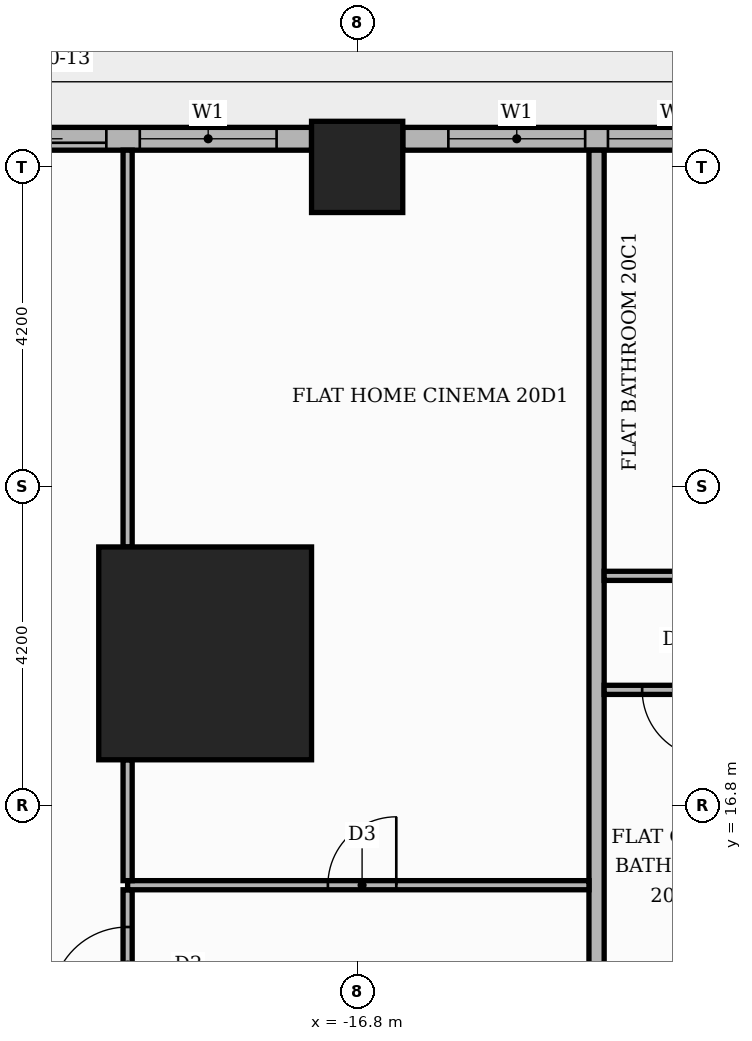
"""IFC4 building model, lengths in metres.
Left out: names, types, materials, properties, quantities, classifications, styles, units other than length and angle.
Written with IfcOpenShell. Run it as: python <this file> out.ifc"""

import sys

from ifc_helpers import new_model, si_unit, direction, frame, frame_2d, origin, origin_2d, place, context, subcontext, project, spatial, rectangle, extrude, element, fill, save


model = new_model("IFC4")
c1 = context("Model", 3, precision=1e-05, world=origin(), true_north=direction((0.0, 1.0)))
c2 = subcontext(c1, "Body", "Model", "MODEL_VIEW")
j1 = project(units=[si_unit("LENGTHUNIT", "METRE"), si_unit("PLANEANGLEUNIT", "RADIAN")], contexts=[c1])
p1 = place(None, origin())
s1 = spatial("IfcSite", under=j1, at=p1, CompositionType="ELEMENT")
p2 = place(p1, origin())
s2 = spatial("IfcBuilding", under=s1, at=p2, CompositionType="ELEMENT")
p3 = place(p2, frame((0.0, 0.0, 87.0)))
s3 = spatial("IfcBuildingStorey", under=s2, at=p3, CompositionType="ELEMENT", Elevation=87.0)
p4 = place(p3, frame((-18.8, 18.8, 0.0), z_axis=(0.0, 0.0, 1.0), x_axis=(1.0, 0.0, 0.0)))
e1 = element("IfcColumn", 1, at=p4, inside=s3, PredefinedType="COLUMN", context=c2, shape_type="SweptSolid", body=[
    extrude(rectangle(XDim=2.8, YDim=2.8, at=origin_2d()), origin(), (0.0, 0.0, 1.0), 3.9),
])
p5 = place(p3, frame((-16.8, 25.2, 0.0), z_axis=(0.0, 0.0, 1.0), x_axis=(1.0, 0.0, 0.0)))
e2 = element("IfcColumn", 2, at=p5, inside=s3, PredefinedType="COLUMN", context=c2, shape_type="SweptSolid", body=[
    extrude(rectangle(XDim=1.2, YDim=1.2, at=origin_2d()), origin(), (0.0, 0.0, 1.0), 3.9),
])
p6 = place(p3, frame((-9.0, 25.57, 0.0), z_axis=(0.0, 0.0, 1.0), x_axis=(-1.0, 0.0, 0.0)))
e3 = element("IfcWall", 3, at=p6, inside=s3, PredefinedType="STANDARD", context=c2, shape_type="SweptSolid", body=[
    extrude(rectangle(XDim=7.2, YDim=0.3, at=frame_2d((3.6, 0.0))), origin(), (0.0, 0.0, 1.0), 3.48),
])
p7 = place(p6, frame((0.6, 0.0, 0.9)))
e4 = element("IfcOpeningElement", 4, at=p7, cuts=e3, PredefinedType="OPENING", context=c2, shape_type="SweptSolid", body=[
    extrude(rectangle(XDim=1.8, YDim=2.1, at=frame_2d((0.9, 1.05))), frame((0.0, 0.16, 0.0), z_axis=(0.0, -1.0, 0.0), x_axis=(1.0, 0.0, 0.0)), (0.0, 0.0, 1.0), 0.32),
])
p8 = place(p6, frame((2.7, 0.0, 0.9)))
e5 = element("IfcOpeningElement", 5, at=p8, cuts=e3, PredefinedType="OPENING", context=c2, shape_type="SweptSolid", body=[
    extrude(rectangle(XDim=1.8, YDim=2.1, at=frame_2d((0.9, 1.05))), frame((0.0, 0.16, 0.0), z_axis=(0.0, -1.0, 0.0), x_axis=(1.0, 0.0, 0.0)), (0.0, 0.0, 1.0), 0.32),
])
p9 = place(p6, frame((4.8, 0.0, 0.9)))
e6 = element("IfcOpeningElement", 6, at=p9, cuts=e3, PredefinedType="OPENING", context=c2, shape_type="SweptSolid", body=[
    extrude(rectangle(XDim=1.8, YDim=2.1, at=frame_2d((0.9, 1.05))), frame((0.0, 0.16, 0.0), z_axis=(0.0, -1.0, 0.0), x_axis=(1.0, 0.0, 0.0)), (0.0, 0.0, 1.0), 0.32),
])
p10 = place(p3, frame((-17.4, 25.57, 0.0), z_axis=(0.0, 0.0, 1.0), x_axis=(-1.0, 0.0, 0.0)))
e7 = element("IfcWall", 7, at=p10, inside=s3, PredefinedType="STANDARD", context=c2, shape_type="SweptSolid", body=[
    extrude(rectangle(XDim=4.82, YDim=0.3, at=frame_2d((2.41, 0.0))), origin(), (0.0, 0.0, 1.0), 3.48),
])
p11 = place(p10, frame((2.7, 0.0, 0.0)))
e8 = element("IfcOpeningElement", 8, at=p11, cuts=e7, PredefinedType="OPENING", context=c2, shape_type="SweptSolid", body=[
    extrude(rectangle(XDim=1.8, YDim=2.4, at=frame_2d((0.9, 1.2))), frame((0.0, 0.16, 0.0), z_axis=(0.0, -1.0, 0.0), x_axis=(1.0, 0.0, 0.0)), (0.0, 0.0, 1.0), 0.32),
])
p12 = place(p10, frame((0.46, 0.0, 0.9)))
e9 = element("IfcOpeningElement", 9, at=p12, cuts=e7, PredefinedType="OPENING", context=c2, shape_type="SweptSolid", body=[
    extrude(rectangle(XDim=1.8, YDim=2.1, at=frame_2d((0.9, 1.05))), frame((0.0, 0.16, 0.0), z_axis=(0.0, -1.0, 0.0), x_axis=(1.0, 0.0, 0.0)), (0.0, 0.0, 1.0), 0.32),
])
p13 = place(p3, frame((-19.82, 13.71, 0.0), z_axis=(0.0, 0.0, 1.0), x_axis=(0.0, 1.0, 0.0)))
e10 = element("IfcWall", 10, at=p13, inside=s3, PredefinedType="PARTITIONING", context=c2, shape_type="SweptSolid", body=[
    extrude(rectangle(XDim=1.98, YDim=0.12, at=frame_2d((0.99, 0.0))), origin(), (0.0, 0.0, 1.0), 3.48),
])
p14 = place(p13, frame((0.49, 0.0, 0.0)))
e11 = element("IfcOpeningElement", 11, at=p14, cuts=e10, PredefinedType="OPENING", context=c2, shape_type="SweptSolid", body=[
    extrude(rectangle(XDim=1.0, YDim=2.1, at=frame_2d((0.5, 1.05))), frame((0.0, 0.07, 0.0), z_axis=(0.0, -1.0, 0.0), x_axis=(1.0, 0.0, 0.0)), (0.0, 0.0, 1.0), 0.14),
])
p15 = place(p3, frame((-13.65, 13.75, 0.0), z_axis=(0.0, 0.0, 1.0), x_axis=(0.0, 1.0, 0.0)))
e12 = element("IfcWall", 12, at=p15, inside=s3, PredefinedType="PARTITIONING", context=c2, shape_type="SweptSolid", body=[
    extrude(rectangle(XDim=11.67, YDim=0.2, at=frame_2d((5.835, 0.0))), origin(), (0.0, 0.0, 1.0), 3.48),
])
p16 = place(p3, frame((-19.82, 15.75, 0.0), z_axis=(0.0, 0.0, 1.0), x_axis=(1.0, 0.0, 0.0)))
e13 = element("IfcWall", 13, at=p16, inside=s3, PredefinedType="PARTITIONING", context=c2, shape_type="SweptSolid", body=[
    extrude(rectangle(XDim=6.07, YDim=0.12, at=frame_2d((3.035, 0.0))), origin(), (0.0, 0.0, 1.0), 3.48),
])
p17 = place(p16, frame((2.635, 0.0, 0.0)))
e14 = element("IfcOpeningElement", 14, at=p17, cuts=e13, PredefinedType="OPENING", context=c2, shape_type="SweptSolid", body=[
    extrude(rectangle(XDim=0.9, YDim=2.1, at=frame_2d((0.45, 1.05))), frame((0.0, 0.07, 0.0), z_axis=(0.0, -1.0, 0.0), x_axis=(1.0, 0.0, 0.0)), (0.0, 0.0, 1.0), 0.14),
])
p18 = place(p3, frame((-19.82, 15.81, 0.0), z_axis=(0.0, 0.0, 1.0), x_axis=(0.0, 1.0, 0.0)))
e15 = element("IfcWall", 15, at=p18, inside=s3, PredefinedType="PARTITIONING", context=c2, shape_type="SweptSolid", body=[
    extrude(rectangle(XDim=1.59, YDim=0.12, at=frame_2d((0.795, 0.0))), origin(), (0.0, 0.0, 1.0), 3.48),
])
p19 = place(p3, frame((-13.55, 18.32, 0.0), z_axis=(0.0, 0.0, 1.0), x_axis=(1.0, 0.0, 0.0)))
e16 = element("IfcWall", 16, at=p19, inside=s3, PredefinedType="PARTITIONING", context=c2, shape_type="SweptSolid", body=[
    extrude(rectangle(XDim=20.9, YDim=0.12, at=frame_2d((10.45, 0.0))), origin(), (0.0, 0.0, 1.0), 3.48),
])
p20 = place(p19, frame((17.525, 0.0, 0.0)))
e17 = element("IfcOpeningElement", 17, at=p20, cuts=e16, PredefinedType="OPENING", context=c2, shape_type="SweptSolid", body=[
    extrude(rectangle(XDim=0.9, YDim=2.1, at=frame_2d((0.45, 1.05))), frame((0.0, 0.07, 0.0), z_axis=(0.0, -1.0, 0.0), x_axis=(1.0, 0.0, 0.0)), (0.0, 0.0, 1.0), 0.14),
])
p21 = place(p19, frame((12.5, 0.0, 0.0)))
e18 = element("IfcOpeningElement", 18, at=p21, cuts=e16, PredefinedType="OPENING", context=c2, shape_type="SweptSolid", body=[
    extrude(rectangle(XDim=0.9, YDim=2.1, at=frame_2d((0.45, 1.05))), frame((0.0, 0.07, 0.0), z_axis=(0.0, -1.0, 0.0), x_axis=(1.0, 0.0, 0.0)), (0.0, 0.0, 1.0), 0.14),
])
p22 = place(p19, frame((7.025, 0.0, 0.0)))
e19 = element("IfcOpeningElement", 19, at=p22, cuts=e16, PredefinedType="OPENING", context=c2, shape_type="SweptSolid", body=[
    extrude(rectangle(XDim=0.9, YDim=2.1, at=frame_2d((0.45, 1.05))), frame((0.0, 0.07, 0.0), z_axis=(0.0, -1.0, 0.0), x_axis=(1.0, 0.0, 0.0)), (0.0, 0.0, 1.0), 0.14),
])
p23 = place(p19, frame((2.6, 0.0, 0.0)))
e20 = element("IfcOpeningElement", 20, at=p23, cuts=e16, PredefinedType="OPENING", context=c2, shape_type="SweptSolid", body=[
    extrude(rectangle(XDim=0.9, YDim=2.1, at=frame_2d((0.45, 1.05))), frame((0.0, 0.07, 0.0), z_axis=(0.0, -1.0, 0.0), x_axis=(1.0, 0.0, 0.0)), (0.0, 0.0, 1.0), 0.14),
])
p24 = place(p19, frame((0.5, 0.0, 0.0)))
e21 = element("IfcOpeningElement", 21, at=p24, cuts=e16, PredefinedType="OPENING", context=c2, shape_type="SweptSolid", body=[
    extrude(rectangle(XDim=0.9, YDim=2.1, at=frame_2d((0.45, 1.05))), frame((0.0, 0.07, 0.0), z_axis=(0.0, -1.0, 0.0), x_axis=(1.0, 0.0, 0.0)), (0.0, 0.0, 1.0), 0.14),
])
p25 = place(p3, frame((-13.55, 19.82, 0.0), z_axis=(0.0, 0.0, 1.0), x_axis=(1.0, 0.0, 0.0)))
e22 = element("IfcWall", 22, at=p25, inside=s3, PredefinedType="PARTITIONING", context=c2, shape_type="SweptSolid", body=[
    extrude(rectangle(XDim=30.95, YDim=0.12, at=frame_2d((15.475, 0.0))), origin(), (0.0, 0.0, 1.0), 3.48),
])
p26 = place(p25, frame((25.65, 0.0, 0.0)))
e23 = element("IfcOpeningElement", 23, at=p26, cuts=e22, PredefinedType="OPENING", context=c2, shape_type="SweptSolid", body=[
    extrude(rectangle(XDim=1.0, YDim=2.1, at=frame_2d((0.5, 1.05))), frame((0.0, 0.07, 0.0), z_axis=(0.0, -1.0, 0.0), x_axis=(1.0, 0.0, 0.0)), (0.0, 0.0, 1.0), 0.14),
])
p27 = place(p25, frame((20.4, 0.0, 0.0)))
e24 = element("IfcOpeningElement", 24, at=p27, cuts=e22, PredefinedType="OPENING", context=c2, shape_type="SweptSolid", body=[
    extrude(rectangle(XDim=1.0, YDim=2.1, at=frame_2d((0.5, 1.05))), frame((0.0, 0.07, 0.0), z_axis=(0.0, -1.0, 0.0), x_axis=(1.0, 0.0, 0.0)), (0.0, 0.0, 1.0), 0.14),
])
p28 = place(p25, frame((13.1, 0.0, 0.0)))
e25 = element("IfcOpeningElement", 25, at=p28, cuts=e22, PredefinedType="OPENING", context=c2, shape_type="SweptSolid", body=[
    extrude(rectangle(XDim=0.9, YDim=2.1, at=frame_2d((0.45, 1.05))), frame((0.0, 0.07, 0.0), z_axis=(0.0, -1.0, 0.0), x_axis=(1.0, 0.0, 0.0)), (0.0, 0.0, 1.0), 0.14),
])
p29 = place(p25, frame((3.65, 0.0, 0.0)))
e26 = element("IfcOpeningElement", 26, at=p29, cuts=e22, PredefinedType="OPENING", context=c2, shape_type="SweptSolid", body=[
    extrude(rectangle(XDim=0.9, YDim=2.1, at=frame_2d((0.45, 1.05))), frame((0.0, 0.07, 0.0), z_axis=(0.0, -1.0, 0.0), x_axis=(1.0, 0.0, 0.0)), (0.0, 0.0, 1.0), 0.14),
])
p30 = place(p3, frame((-19.82, 20.2, 0.0), z_axis=(0.0, 0.0, 1.0), x_axis=(0.0, 1.0, 0.0)))
e27 = element("IfcWall", 27, at=p30, inside=s3, PredefinedType="PARTITIONING", context=c2, shape_type="SweptSolid", body=[
    extrude(rectangle(XDim=5.22, YDim=0.12, at=frame_2d((2.61, 0.0))), origin(), (0.0, 0.0, 1.0), 3.48),
])
p31 = place(p8, origin())
e28 = element("IfcWindow", 28, at=p31, inside=s3, PartitioningType="SINGLE_PANEL", PredefinedType="WINDOW", context=c2, shape_type="SweptSolid", body=[
    extrude(rectangle(XDim=1.8, YDim=2.1, at=frame_2d((0.9, 1.05))), frame((0.0, 0.03, 0.0), z_axis=(0.0, -1.0, 0.0), x_axis=(1.0, 0.0, 0.0)), (0.0, 0.0, 1.0), 0.06),
])
fill(e5, e28)
p32 = place(p9, origin())
e29 = element("IfcWindow", 29, at=p32, inside=s3, PartitioningType="SINGLE_PANEL", PredefinedType="WINDOW", context=c2, shape_type="SweptSolid", body=[
    extrude(rectangle(XDim=1.8, YDim=2.1, at=frame_2d((0.9, 1.05))), frame((0.0, 0.03, 0.0), z_axis=(0.0, -1.0, 0.0), x_axis=(1.0, 0.0, 0.0)), (0.0, 0.0, 1.0), 0.06),
])
fill(e6, e29)
p33 = place(p11, origin())
e30 = element("IfcDoor", 30, at=p33, inside=s3, OperationType="SLIDING_TO_LEFT", PredefinedType="DOOR", context=c2, shape_type="SweptSolid", body=[
    extrude(rectangle(XDim=1.8, YDim=2.4, at=frame_2d((0.9, 1.2))), frame((0.0, 0.025, 0.0), z_axis=(0.0, -1.0, 0.0), x_axis=(1.0, 0.0, 0.0)), (0.0, 0.0, 1.0), 0.05),
])
fill(e8, e30)
p34 = place(p12, origin())
e31 = element("IfcWindow", 31, at=p34, inside=s3, PartitioningType="SINGLE_PANEL", PredefinedType="WINDOW", context=c2, shape_type="SweptSolid", body=[
    extrude(rectangle(XDim=1.8, YDim=2.1, at=frame_2d((0.9, 1.05))), frame((0.0, 0.03, 0.0), z_axis=(0.0, -1.0, 0.0), x_axis=(1.0, 0.0, 0.0)), (0.0, 0.0, 1.0), 0.06),
])
fill(e9, e31)
p35 = place(p24, frame((0.9, 0.0, 0.0), z_axis=(0.0, 0.0, 1.0), x_axis=(-1.0, 0.0, 0.0)))
e32 = element("IfcDoor", 32, at=p35, inside=s3, OperationType="SINGLE_SWING_RIGHT", PredefinedType="DOOR", context=c2, shape_type="SweptSolid", body=[
    extrude(rectangle(XDim=0.9, YDim=2.1, at=frame_2d((0.45, 1.05))), frame((0.0, 0.025, 0.0), z_axis=(0.0, -1.0, 0.0), x_axis=(1.0, 0.0, 0.0)), (0.0, 0.0, 1.0), 0.05),
])
fill(e21, e32)
p36 = place(p17, origin())
e33 = element("IfcDoor", 33, at=p36, inside=s3, OperationType="SINGLE_SWING_RIGHT", PredefinedType="DOOR", context=c2, shape_type="SweptSolid", body=[
    extrude(rectangle(XDim=0.9, YDim=2.1, at=frame_2d((0.45, 1.05))), frame((0.0, 0.025, 0.0), z_axis=(0.0, -1.0, 0.0), x_axis=(1.0, 0.0, 0.0)), (0.0, 0.0, 1.0), 0.05),
])
fill(e14, e33)
p37 = place(p14, origin())
e34 = element("IfcDoor", 34, at=p37, inside=s3, OperationType="SINGLE_SWING_LEFT", PredefinedType="DOOR", context=c2, shape_type="SweptSolid", body=[
    extrude(rectangle(XDim=1.0, YDim=2.1, at=frame_2d((0.5, 1.05))), frame((0.0, 0.025, 0.0), z_axis=(0.0, -1.0, 0.0), x_axis=(1.0, 0.0, 0.0)), (0.0, 0.0, 1.0), 0.05),
])
fill(e11, e34)
save(model, sys.argv[1])
